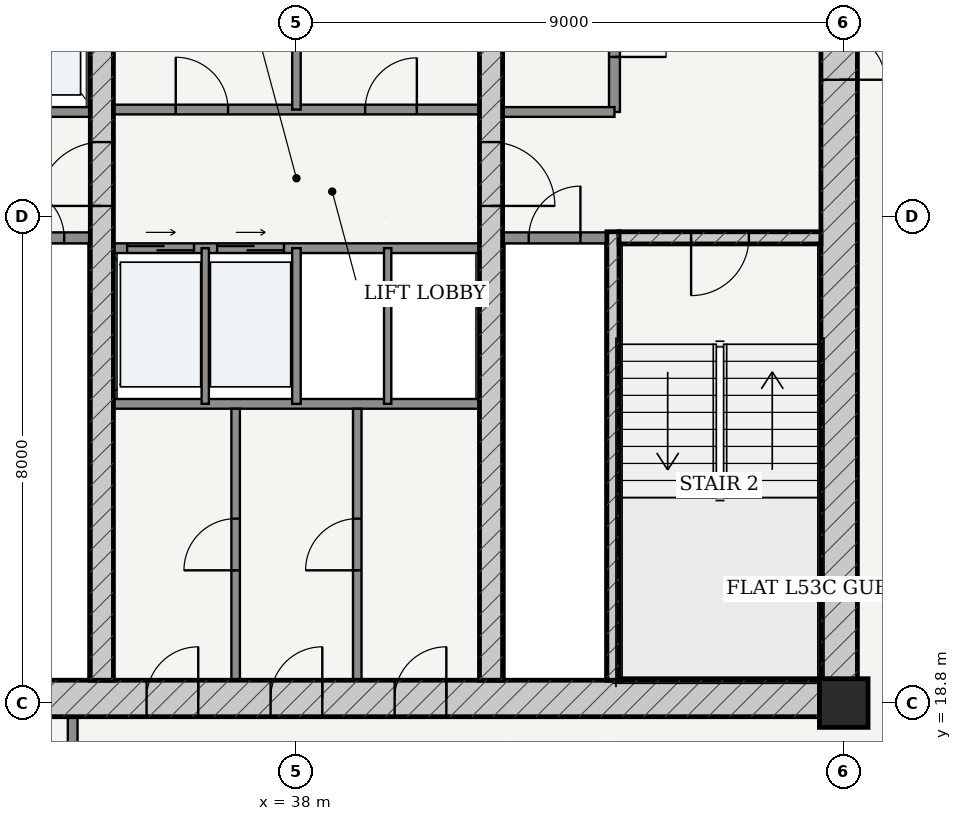
"""IFC4 building model, lengths in metres.
Left out: names, types, materials, properties, quantities, classifications, styles, units other than length and angle.
Written with IfcOpenShell. Run it as: python <this file> out.ifc"""

import sys

from ifc_helpers import new_model, si_unit, direction, frame, frame_2d, origin, origin_2d, place, context, subcontext, project, spatial, rectangle, extrude, source, transform, mapped, element, fill, save


model = new_model("IFC4")
c1 = context("Model", 3, precision=1e-05, world=origin(), true_north=direction((-0.2419218956, 0.970295726276)))
c2 = subcontext(c1, "Body", "Model", "MODEL_VIEW")
j1 = project(units=[si_unit("LENGTHUNIT", "METRE"), si_unit("PLANEANGLEUNIT", "RADIAN")], contexts=[c1])
p1 = place(None, origin())
s1 = spatial("IfcSite", under=j1, at=p1, CompositionType="ELEMENT")
p2 = place(p1, origin())
s2 = spatial("IfcBuilding", under=s1, at=p2, CompositionType="ELEMENT")
p3 = place(p2, frame((0.0, 0.0, 202.3)))
s3 = spatial("IfcBuildingStorey", under=s2, at=p3, CompositionType="ELEMENT", Elevation=202.3)
p4 = place(p3, frame((47.0, 18.8, 0.0), z_axis=(0.0, 0.0, 1.0), x_axis=(1.0, 0.0, 0.0)))
e1 = element("IfcColumn", 1, at=p4, inside=s3, PredefinedType="COLUMN", context=c2, shape_type="SweptSolid", body=[
    extrude(rectangle(XDim=0.8, YDim=0.8, at=origin_2d()), origin(), (0.0, 0.0, 1.0), 3.7),
])
p5 = place(p3, frame((28.775, 18.875, 0.0), z_axis=(0.0, 0.0, 1.0), x_axis=(1.0, 0.0, 0.0)))
e2 = element("IfcWall", 2, at=p5, inside=s3, PredefinedType="SHEAR", context=c2, shape_type="SweptSolid", body=[
    extrude(rectangle(XDim=18.45, YDim=0.6, at=frame_2d((9.225, 0.0))), origin(), (0.0, 0.0, 1.0), 3.435),
])
p6 = place(p5, frame((6.76, 0.0, 0.0)))
e3 = element("IfcOpeningElement", 3, at=p6, cuts=e2, PredefinedType="OPENING", context=c2, shape_type="SweptSolid", body=[
    extrude(rectangle(XDim=0.85, YDim=2.1, at=frame_2d((0.425, 1.05))), frame((0.0, 0.31, 0.0), z_axis=(0.0, -1.0, 0.0), x_axis=(1.0, 0.0, 0.0)), (0.0, 0.0, 1.0), 0.62),
])
p7 = place(p5, frame((8.8, 0.0, 0.0)))
e4 = element("IfcOpeningElement", 4, at=p7, cuts=e2, PredefinedType="OPENING", context=c2, shape_type="SweptSolid", body=[
    extrude(rectangle(XDim=0.85, YDim=2.1, at=frame_2d((0.425, 1.05))), frame((0.0, 0.31, 0.0), z_axis=(0.0, -1.0, 0.0), x_axis=(1.0, 0.0, 0.0)), (0.0, 0.0, 1.0), 0.62),
])
p8 = place(p5, frame((10.84, 0.0, 0.0)))
e5 = element("IfcOpeningElement", 5, at=p8, cuts=e2, PredefinedType="OPENING", context=c2, shape_type="SweptSolid", body=[
    extrude(rectangle(XDim=0.85, YDim=2.1, at=frame_2d((0.425, 1.05))), frame((0.0, 0.31, 0.0), z_axis=(0.0, -1.0, 0.0), x_axis=(1.0, 0.0, 0.0)), (0.0, 0.0, 1.0), 0.62),
])
p9 = place(p3, frame((46.925, 19.175, 0.0), z_axis=(0.0, 0.0, 1.0), x_axis=(0.0, 1.0, 0.0)))
e6 = element("IfcWall", 6, at=p9, inside=s3, PredefinedType="SHEAR", context=c2, shape_type="SweptSolid", body=[
    extrude(rectangle(XDim=15.25, YDim=0.6, at=frame_2d((7.625, 0.0))), origin(), (0.0, 0.0, 1.0), 3.435),
])
p10 = place(p9, frame((9.875, 0.0, 0.0)))
e7 = element("IfcOpeningElement", 7, at=p10, cuts=e6, PredefinedType="OPENING", context=c2, shape_type="SweptSolid", body=[
    extrude(rectangle(XDim=1.5, YDim=2.2, at=frame_2d((0.75, 1.1))), frame((0.0, 0.31, 0.0), z_axis=(0.0, -1.0, 0.0), x_axis=(1.0, 0.0, 0.0)), (0.0, 0.0, 1.0), 0.62),
])
p11 = place(p3, frame((43.205, 19.175, 0.0), z_axis=(0.0, 0.0, 1.0), x_axis=(0.0, 1.0, 0.0)))
e8 = element("IfcWall", 8, at=p11, inside=s3, PredefinedType="SOLIDWALL", context=c2, shape_type="SweptSolid", body=[
    extrude(rectangle(XDim=7.375, YDim=0.2, at=frame_2d((3.688, 0.0))), origin(), (0.0, 0.0, 1.0), 3.435),
])
p12 = place(p3, frame((43.305, 26.45, 0.0), z_axis=(0.0, 0.0, 1.0), x_axis=(1.0, 0.0, 0.0)))
e9 = element("IfcWall", 9, at=p12, inside=s3, PredefinedType="SOLIDWALL", context=c2, shape_type="SweptSolid", body=[
    extrude(rectangle(XDim=3.32, YDim=0.2, at=frame_2d((1.66, 0.0))), origin(), (0.0, 0.0, 1.0), 3.435),
])
p13 = place(p12, frame((1.185, 0.0, 0.0)))
e10 = element("IfcOpeningElement", 10, at=p13, cuts=e9, PredefinedType="OPENING", context=c2, shape_type="SweptSolid", body=[
    extrude(rectangle(XDim=0.95, YDim=2.15, at=frame_2d((0.475, 1.075))), frame((0.0, 0.11, 0.0), z_axis=(0.0, -1.0, 0.0), x_axis=(1.0, 0.0, 0.0)), (0.0, 0.0, 1.0), 0.22),
])
p14 = place(p3, frame((34.8, 19.175, 0.0), z_axis=(0.0, 0.0, 1.0), x_axis=(0.0, 1.0, 0.0)))
e11 = element("IfcWall", 11, at=p14, inside=s3, PredefinedType="SHEAR", context=c2, shape_type="SweptSolid", body=[
    extrude(rectangle(XDim=15.25, YDim=0.38, at=frame_2d((7.625, 0.0))), origin(), (0.0, 0.0, 1.0), 3.435),
])
p15 = place(p14, frame((7.8, 0.0, 0.0)))
e12 = element("IfcOpeningElement", 12, at=p15, cuts=e11, PredefinedType="OPENING", context=c2, shape_type="SweptSolid", body=[
    extrude(rectangle(XDim=1.05, YDim=2.15, at=frame_2d((0.525, 1.075))), frame((0.0, 0.2, 0.0), z_axis=(0.0, -1.0, 0.0), x_axis=(1.0, 0.0, 0.0)), (0.0, 0.0, 1.0), 0.4),
])
p16 = place(p3, frame((41.2, 19.175, 0.0), z_axis=(0.0, 0.0, 1.0), x_axis=(0.0, 1.0, 0.0)))
e13 = element("IfcWall", 13, at=p16, inside=s3, PredefinedType="SHEAR", context=c2, shape_type="SweptSolid", body=[
    extrude(rectangle(XDim=15.25, YDim=0.38, at=frame_2d((7.625, 0.0))), origin(), (0.0, 0.0, 1.0), 3.435),
])
p17 = place(p16, frame((7.8, 0.0, 0.0)))
e14 = element("IfcOpeningElement", 14, at=p17, cuts=e13, PredefinedType="OPENING", context=c2, shape_type="SweptSolid", body=[
    extrude(rectangle(XDim=1.05, YDim=2.15, at=frame_2d((0.525, 1.075))), frame((0.0, 0.2, 0.0), z_axis=(0.0, -1.0, 0.0), x_axis=(1.0, 0.0, 0.0)), (0.0, 0.0, 1.0), 0.4),
])
p18 = place(p3, frame((32.9, 26.45, 0.0), z_axis=(0.0, 0.0, 1.0), x_axis=(1.0, 0.0, 0.0)))
e15 = element("IfcWall", 15, at=p18, inside=s3, PredefinedType="PARTITIONING", context=c2, shape_type="SweptSolid", body=[
    extrude(rectangle(XDim=1.71, YDim=0.18, at=frame_2d((0.855, 0.0))), origin(), (0.0, 0.0, 1.0), 3.435),
])
p19 = place(p18, frame((0.43, 0.0, 0.0)))
e16 = element("IfcOpeningElement", 16, at=p19, cuts=e15, PredefinedType="OPENING", context=c2, shape_type="SweptSolid", body=[
    extrude(rectangle(XDim=0.85, YDim=2.1, at=frame_2d((0.425, 1.05))), frame((0.0, 0.1, 0.0), z_axis=(0.0, -1.0, 0.0), x_axis=(1.0, 0.0, 0.0)), (0.0, 0.0, 1.0), 0.2),
])
p20 = place(p3, frame((41.39, 26.45, 0.0), z_axis=(0.0, 0.0, 1.0), x_axis=(1.0, 0.0, 0.0)))
e17 = element("IfcWall", 17, at=p20, inside=s3, PredefinedType="PARTITIONING", context=c2, shape_type="SweptSolid", body=[
    extrude(rectangle(XDim=1.71, YDim=0.18, at=frame_2d((0.855, 0.0))), origin(), (0.0, 0.0, 1.0), 3.435),
])
p21 = place(p20, frame((0.43, 0.0, 0.0)))
e18 = element("IfcOpeningElement", 18, at=p21, cuts=e17, PredefinedType="OPENING", context=c2, shape_type="SweptSolid", body=[
    extrude(rectangle(XDim=0.85, YDim=2.1, at=frame_2d((0.425, 1.05))), frame((0.0, 0.1, 0.0), z_axis=(0.0, -1.0, 0.0), x_axis=(1.0, 0.0, 0.0)), (0.0, 0.0, 1.0), 0.2),
])
p22 = place(p3, frame((32.77, 28.52, 0.0), z_axis=(0.0, 0.0, 1.0), x_axis=(1.0, 0.0, 0.0)))
e19 = element("IfcWall", 19, at=p22, inside=s3, PredefinedType="PARTITIONING", context=c2, shape_type="SweptSolid", body=[
    extrude(rectangle(XDim=1.84, YDim=0.16, at=frame_2d((0.92, 0.0))), origin(), (0.0, 0.0, 1.0), 3.435),
])
p23 = place(p3, frame((43.23, 28.52, 0.0), z_axis=(0.0, 0.0, 1.0), x_axis=(0.0, 1.0, 0.0)))
e20 = element("IfcWall", 20, at=p23, inside=s3, PredefinedType="PARTITIONING", context=c2, shape_type="SweptSolid", body=[
    extrude(rectangle(XDim=5.905, YDim=0.18, at=frame_2d((2.953, 0.0))), origin(), (0.0, 0.0, 1.0), 3.435),
])
p24 = place(p23, frame((0.905, 0.0, 0.0)))
e21 = element("IfcOpeningElement", 21, at=p24, cuts=e20, PredefinedType="OPENING", context=c2, shape_type="SweptSolid", body=[
    extrude(rectangle(XDim=0.85, YDim=2.1, at=frame_2d((0.425, 1.05))), frame((0.0, 0.1, 0.0), z_axis=(0.0, -1.0, 0.0), x_axis=(1.0, 0.0, 0.0)), (0.0, 0.0, 1.0), 0.2),
])
p25 = place(p23, frame((3.655, 0.0, 0.0)))
e22 = element("IfcOpeningElement", 22, at=p25, cuts=e20, PredefinedType="OPENING", context=c2, shape_type="SweptSolid", body=[
    extrude(rectangle(XDim=1.15, YDim=2.2, at=frame_2d((0.575, 1.1))), frame((0.0, 0.1, 0.0), z_axis=(0.0, -1.0, 0.0), x_axis=(1.0, 0.0, 0.0)), (0.0, 0.0, 1.0), 0.2),
])
p26 = place(p3, frame((41.39, 28.52, 0.0), z_axis=(0.0, 0.0, 1.0), x_axis=(1.0, 0.0, 0.0)))
e23 = element("IfcWall", 23, at=p26, inside=s3, PredefinedType="PARTITIONING", context=c2, shape_type="SweptSolid", body=[
    extrude(rectangle(XDim=1.84, YDim=0.16, at=frame_2d((0.92, 0.0))), origin(), (0.0, 0.0, 1.0), 3.435),
])
p27 = place(p3, frame((34.99, 28.56, 0.0), z_axis=(0.0, 0.0, 1.0), x_axis=(1.0, 0.0, 0.0)))
e24 = element("IfcWall", 24, at=p27, inside=s3, PredefinedType="PARTITIONING", context=c2, shape_type="SweptSolid", body=[
    extrude(rectangle(XDim=6.02, YDim=0.16, at=frame_2d((3.01, 0.0))), origin(), (0.0, 0.0, 1.0), 3.435),
])
p28 = place(p27, frame((1.025, 0.0, 0.0)))
e25 = element("IfcOpeningElement", 25, at=p28, cuts=e24, PredefinedType="OPENING", context=c2, shape_type="SweptSolid", body=[
    extrude(rectangle(XDim=0.86, YDim=2.1, at=frame_2d((0.43, 1.05))), frame((0.0, 0.09, 0.0), z_axis=(0.0, -1.0, 0.0), x_axis=(1.0, 0.0, 0.0)), (0.0, 0.0, 1.0), 0.18),
])
p29 = place(p27, frame((4.14, 0.0, 0.0)))
e26 = element("IfcOpeningElement", 26, at=p29, cuts=e24, PredefinedType="OPENING", context=c2, shape_type="SweptSolid", body=[
    extrude(rectangle(XDim=0.85, YDim=2.1, at=frame_2d((0.425, 1.05))), frame((0.0, 0.09, 0.0), z_axis=(0.0, -1.0, 0.0), x_axis=(1.0, 0.0, 0.0)), (0.0, 0.0, 1.0), 0.18),
])
p30 = place(p3, frame((38.0, 28.56, 0.0), z_axis=(0.0, 0.0, 1.0), x_axis=(0.0, 1.0, 0.0)))
e27 = element("IfcWall", 27, at=p30, inside=s3, PredefinedType="PARTITIONING", context=c2, shape_type="SweptSolid", body=[
    extrude(rectangle(XDim=5.865, YDim=0.14, at=frame_2d((2.933, 0.0))), origin(), (0.0, 0.0, 1.0), 3.435),
])
p31 = place(p3, frame((34.99, 26.28, 0.0), z_axis=(0.0, 0.0, 1.0), x_axis=(1.0, 0.0, 0.0)))
e28 = element("IfcWall", 28, at=p31, inside=s3, PredefinedType="PARTITIONING", context=c2, shape_type="SweptSolid", body=[
    extrude(rectangle(XDim=6.02, YDim=0.16, at=frame_2d((3.01, 0.0))), origin(), (0.0, 0.0, 1.0), 3.435),
])
p32 = place(p31, frame((0.225, 0.0, 0.0)))
e29 = element("IfcOpeningElement", 29, at=p32, cuts=e28, PredefinedType="OPENING", context=c2, shape_type="SweptSolid", body=[
    extrude(rectangle(XDim=1.1, YDim=2.2, at=frame_2d((0.55, 1.1))), frame((0.0, 0.09, 0.0), z_axis=(0.0, -1.0, 0.0), x_axis=(1.0, 0.0, 0.0)), (0.0, 0.0, 1.0), 0.18),
])
p33 = place(p31, frame((1.705, 0.0, 0.0)))
e30 = element("IfcOpeningElement", 30, at=p33, cuts=e28, PredefinedType="OPENING", context=c2, shape_type="SweptSolid", body=[
    extrude(rectangle(XDim=1.1, YDim=2.2, at=frame_2d((0.55, 1.1))), frame((0.0, 0.09, 0.0), z_axis=(0.0, -1.0, 0.0), x_axis=(1.0, 0.0, 0.0)), (0.0, 0.0, 1.0), 0.18),
])
p34 = place(p3, frame((34.99, 23.72, 0.0), z_axis=(0.0, 0.0, 1.0), x_axis=(1.0, 0.0, 0.0)))
e31 = element("IfcWall", 31, at=p34, inside=s3, PredefinedType="PARTITIONING", context=c2, shape_type="SweptSolid", body=[
    extrude(rectangle(XDim=6.02, YDim=0.16, at=frame_2d((3.01, 0.0))), origin(), (0.0, 0.0, 1.0), 3.435),
])
p35 = place(p3, frame((36.5, 23.72, 0.0), z_axis=(0.0, 0.0, 1.0), x_axis=(0.0, 1.0, 0.0)))
e32 = element("IfcWall", 32, at=p35, inside=s3, PredefinedType="PARTITIONING", context=c2, shape_type="SweptSolid", body=[
    extrude(rectangle(XDim=2.56, YDim=0.12, at=frame_2d((1.28, 0.0))), origin(), (0.0, 0.0, 1.0), 3.435),
])
p36 = place(p3, frame((38.0, 23.72, 0.0), z_axis=(0.0, 0.0, 1.0), x_axis=(0.0, 1.0, 0.0)))
e33 = element("IfcWall", 33, at=p36, inside=s3, PredefinedType="PARTITIONING", context=c2, shape_type="SweptSolid", body=[
    extrude(rectangle(XDim=2.56, YDim=0.14, at=frame_2d((1.28, 0.0))), origin(), (0.0, 0.0, 1.0), 3.435),
])
p37 = place(p3, frame((39.5, 23.72, 0.0), z_axis=(0.0, 0.0, 1.0), x_axis=(0.0, 1.0, 0.0)))
e34 = element("IfcWall", 34, at=p37, inside=s3, PredefinedType="PARTITIONING", context=c2, shape_type="SweptSolid", body=[
    extrude(rectangle(XDim=2.56, YDim=0.12, at=frame_2d((1.28, 0.0))), origin(), (0.0, 0.0, 1.0), 3.435),
])
p38 = place(p3, frame((37.0, 19.175, 0.0), z_axis=(0.0, 0.0, 1.0), x_axis=(0.0, 1.0, 0.0)))
e35 = element("IfcWall", 35, at=p38, inside=s3, PredefinedType="PARTITIONING", context=c2, shape_type="SweptSolid", body=[
    extrude(rectangle(XDim=4.465, YDim=0.14, at=frame_2d((2.232, 0.0))), origin(), (0.0, 0.0, 1.0), 3.435),
])
p39 = place(p38, frame((1.808, 0.0, 0.0)))
e36 = element("IfcOpeningElement", 36, at=p39, cuts=e35, PredefinedType="OPENING", context=c2, shape_type="SweptSolid", body=[
    extrude(rectangle(XDim=0.85, YDim=2.1, at=frame_2d((0.425, 1.05))), frame((0.0, 0.08, 0.0), z_axis=(0.0, -1.0, 0.0), x_axis=(1.0, 0.0, 0.0)), (0.0, 0.0, 1.0), 0.16),
])
p40 = place(p3, frame((39.0, 19.175, 0.0), z_axis=(0.0, 0.0, 1.0), x_axis=(0.0, 1.0, 0.0)))
e37 = element("IfcWall", 37, at=p40, inside=s3, PredefinedType="PARTITIONING", context=c2, shape_type="SweptSolid", body=[
    extrude(rectangle(XDim=4.465, YDim=0.14, at=frame_2d((2.232, 0.0))), origin(), (0.0, 0.0, 1.0), 3.435),
])
p41 = place(p40, frame((1.808, 0.0, 0.0)))
e38 = element("IfcOpeningElement", 38, at=p41, cuts=e37, PredefinedType="OPENING", context=c2, shape_type="SweptSolid", body=[
    extrude(rectangle(XDim=0.85, YDim=2.1, at=frame_2d((0.425, 1.05))), frame((0.0, 0.08, 0.0), z_axis=(0.0, -1.0, 0.0), x_axis=(1.0, 0.0, 0.0)), (0.0, 0.0, 1.0), 0.16),
])
p42 = place(p3, frame((34.32, 16.725, 0.0), z_axis=(0.0, 0.0, 1.0), x_axis=(0.0, 1.0, 0.0)))
e39 = element("IfcWall", 39, at=p42, inside=s3, PredefinedType="PARTITIONING", context=c2, shape_type="SweptSolid", body=[
    extrude(rectangle(XDim=1.85, YDim=0.16, at=frame_2d((0.925, 0.0))), origin(), (0.0, 0.0, 1.0), 3.435),
])
m1 = source(origin(), c2, "Body", "SweptSolid", [
    extrude(rectangle(XDim=1.5, YDim=2.2, at=frame_2d((0.75, 1.1))), frame((0.0, 0.025, 0.0), z_axis=(0.0, -1.0, 0.0), x_axis=(1.0, 0.0, 0.0)), (0.0, 0.0, 1.0), 0.05),
])
p43 = place(p10, frame((1.5, 0.0, 0.0), z_axis=(0.0, 0.0, 1.0), x_axis=(-1.0, 0.0, 0.0)))
e40 = element("IfcDoor", 40, at=p43, inside=s3, OperationType="DOUBLE_DOOR_SINGLE_SWING", PredefinedType="DOOR", context=c2, shape_type="MappedRepresentation", body=[
    mapped(m1, transform((0.0, 0.0, 0.0), scale=1.0)),
])
fill(e7, e40)
m2 = source(origin(), c2, "Body", "SweptSolid", [
    extrude(rectangle(XDim=1.05, YDim=2.15, at=frame_2d((0.525, 1.075))), frame((0.0, 0.025, 0.0), z_axis=(0.0, -1.0, 0.0), x_axis=(1.0, 0.0, 0.0)), (0.0, 0.0, 1.0), 0.05),
])
p44 = place(p15, origin())
e41 = element("IfcDoor", 41, at=p44, inside=s3, OperationType="SINGLE_SWING_LEFT", PredefinedType="DOOR", context=c2, shape_type="MappedRepresentation", body=[
    mapped(m2, transform((0.0, 0.0, 0.0), scale=1.0)),
])
fill(e12, e41)
p45 = place(p17, frame((1.05, 0.0, 0.0), z_axis=(0.0, 0.0, 1.0), x_axis=(-1.0, 0.0, 0.0)))
e42 = element("IfcDoor", 42, at=p45, inside=s3, OperationType="SINGLE_SWING_RIGHT", PredefinedType="DOOR", context=c2, shape_type="MappedRepresentation", body=[
    mapped(m2, transform((0.0, 0.0, 0.0), scale=1.0)),
])
fill(e14, e42)
m3 = source(origin(), c2, "Body", "SweptSolid", [
    extrude(rectangle(XDim=0.95, YDim=2.15, at=frame_2d((0.475, 1.075))), frame((0.0, 0.025, 0.0), z_axis=(0.0, -1.0, 0.0), x_axis=(1.0, 0.0, 0.0)), (0.0, 0.0, 1.0), 0.05),
])
p46 = place(p13, frame((0.95, 0.0, 0.0), z_axis=(0.0, 0.0, 1.0), x_axis=(-1.0, 0.0, 0.0)))
e43 = element("IfcDoor", 43, at=p46, inside=s3, OperationType="SINGLE_SWING_RIGHT", PredefinedType="DOOR", context=c2, shape_type="MappedRepresentation", body=[
    mapped(m3, transform((0.0, 0.0, 0.0), scale=1.0)),
])
fill(e10, e43)
m4 = source(origin(), c2, "Body", "SweptSolid", [
    extrude(rectangle(XDim=0.85, YDim=2.1, at=frame_2d((0.425, 1.05))), frame((0.0, 0.025, 0.0), z_axis=(0.0, -1.0, 0.0), x_axis=(1.0, 0.0, 0.0)), (0.0, 0.0, 1.0), 0.05),
])
p47 = place(p19, origin())
e44 = element("IfcDoor", 44, at=p47, inside=s3, OperationType="SINGLE_SWING_LEFT", PredefinedType="DOOR", context=c2, shape_type="MappedRepresentation", body=[
    mapped(m4, transform((0.0, 0.0, 0.0), scale=1.0)),
])
fill(e16, e44)
p48 = place(p21, origin())
e45 = element("IfcDoor", 45, at=p48, inside=s3, OperationType="SINGLE_SWING_RIGHT", PredefinedType="DOOR", context=c2, shape_type="MappedRepresentation", body=[
    mapped(m4, transform((0.0, 0.0, 0.0), scale=1.0)),
])
fill(e18, e45)
p49 = place(p24, frame((0.85, 0.0, 0.0), z_axis=(0.0, 0.0, 1.0), x_axis=(-1.0, 0.0, 0.0)))
e46 = element("IfcDoor", 46, at=p49, inside=s3, OperationType="SINGLE_SWING_RIGHT", PredefinedType="DOOR", context=c2, shape_type="MappedRepresentation", body=[
    mapped(m4, transform((0.0, 0.0, 0.0), scale=1.0)),
])
fill(e21, e46)
m5 = source(origin(), c2, "Body", "SweptSolid", [
    extrude(rectangle(XDim=0.86, YDim=2.1, at=frame_2d((0.43, 1.05))), frame((0.0, 0.025, 0.0), z_axis=(0.0, -1.0, 0.0), x_axis=(1.0, 0.0, 0.0)), (0.0, 0.0, 1.0), 0.05),
])
p50 = place(p28, origin())
e47 = element("IfcDoor", 47, at=p50, inside=s3, OperationType="SINGLE_SWING_LEFT", PredefinedType="DOOR", context=c2, shape_type="MappedRepresentation", body=[
    mapped(m5, transform((0.0, 0.0, 0.0), scale=1.0)),
])
fill(e25, e47)
p51 = place(p29, origin())
e48 = element("IfcDoor", 48, at=p51, inside=s3, OperationType="SINGLE_SWING_RIGHT", PredefinedType="DOOR", context=c2, shape_type="MappedRepresentation", body=[
    mapped(m4, transform((0.0, 0.0, 0.0), scale=1.0)),
])
fill(e26, e48)
p52 = place(p6, origin())
e49 = element("IfcDoor", 49, at=p52, inside=s3, OperationType="SINGLE_SWING_RIGHT", PredefinedType="DOOR", context=c2, shape_type="MappedRepresentation", body=[
    mapped(m4, transform((0.0, 0.0, 0.0), scale=1.0)),
])
fill(e3, e49)
p53 = place(p7, origin())
e50 = element("IfcDoor", 50, at=p53, inside=s3, OperationType="SINGLE_SWING_RIGHT", PredefinedType="DOOR", context=c2, shape_type="MappedRepresentation", body=[
    mapped(m4, transform((0.0, 0.0, 0.0), scale=1.0)),
])
fill(e4, e50)
p54 = place(p8, origin())
e51 = element("IfcDoor", 51, at=p54, inside=s3, OperationType="SINGLE_SWING_RIGHT", PredefinedType="DOOR", context=c2, shape_type="MappedRepresentation", body=[
    mapped(m4, transform((0.0, 0.0, 0.0), scale=1.0)),
])
fill(e5, e51)
p55 = place(p39, origin())
e52 = element("IfcDoor", 52, at=p55, inside=s3, OperationType="SINGLE_SWING_LEFT", PredefinedType="DOOR", context=c2, shape_type="MappedRepresentation", body=[
    mapped(m4, transform((0.0, 0.0, 0.0), scale=1.0)),
])
fill(e36, e52)
p56 = place(p41, origin())
e53 = element("IfcDoor", 53, at=p56, inside=s3, OperationType="SINGLE_SWING_LEFT", PredefinedType="DOOR", context=c2, shape_type="MappedRepresentation", body=[
    mapped(m4, transform((0.0, 0.0, 0.0), scale=1.0)),
])
fill(e38, e53)
m6 = source(origin(), c2, "Body", "SweptSolid", [
    extrude(rectangle(XDim=1.1, YDim=2.2, at=frame_2d((0.55, 1.1))), frame((0.0, 0.025, 0.0), z_axis=(0.0, -1.0, 0.0), x_axis=(1.0, 0.0, 0.0)), (0.0, 0.0, 1.0), 0.05),
])
p57 = place(p32, origin())
e54 = element("IfcDoor", 54, at=p57, inside=s3, OperationType="DOUBLE_DOOR_SLIDING", PredefinedType="DOOR", context=c2, shape_type="MappedRepresentation", body=[
    mapped(m6, transform((0.0, 0.0, 0.0), scale=1.0)),
])
fill(e29, e54)
p58 = place(p33, origin())
e55 = element("IfcDoor", 55, at=p58, inside=s3, OperationType="DOUBLE_DOOR_SLIDING", PredefinedType="DOOR", context=c2, shape_type="MappedRepresentation", body=[
    mapped(m6, transform((0.0, 0.0, 0.0), scale=1.0)),
])
fill(e30, e55)
save(model, sys.argv[1])
